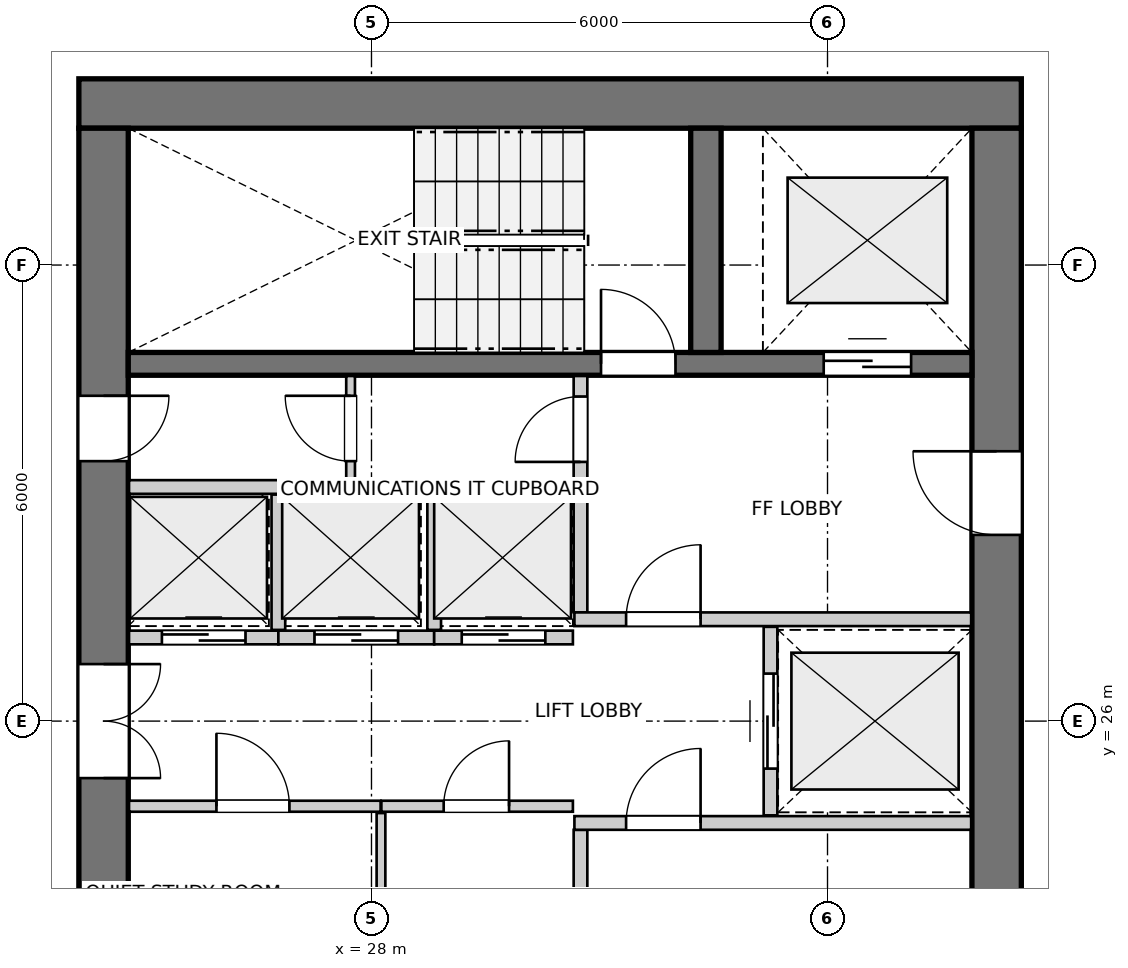
"""IFC4 building model, lengths in metres.
Left out: names, types, materials, properties, quantities, classifications, styles, units other than length and angle.
Written with IfcOpenShell. Run it as: python <this file> out.ifc"""

import sys

from ifc_helpers import new_model, si_unit, direction, frame, frame_2d, origin, place, context, subcontext, project, spatial, rectangle, extrude, source, transform, mapped, element, fill, save


model = new_model("IFC4")
c1 = context("Model", 3, precision=1e-05, world=origin(), true_north=direction((0.0, 1.0)))
c2 = subcontext(c1, "Body", "Model", "MODEL_VIEW")
j1 = project(units=[si_unit("LENGTHUNIT", "METRE"), si_unit("PLANEANGLEUNIT", "RADIAN")], contexts=[c1])
p1 = place(None, origin())
s1 = spatial("IfcSite", under=j1, at=p1, CompositionType="ELEMENT")
p2 = place(p1, origin())
s2 = spatial("IfcBuilding", under=s1, at=p2, CompositionType="ELEMENT")
p3 = place(p2, frame((0.0, 0.0, 149.0)))
s3 = spatial("IfcBuildingStorey", under=s2, at=p3, CompositionType="ELEMENT", Elevation=149.0)
p4 = place(p3, frame((36.55, 34.125, 0.0), z_axis=(0.0, 0.0, 1.0), x_axis=(-1.0, 0.0, 0.0)))
e1 = element("IfcWall", 1, at=p4, inside=s3, PredefinedType="SHEAR", context=c2, shape_type="SweptSolid", body=[
    extrude(rectangle(XDim=12.4, YDim=0.65, at=frame_2d((6.2, 0.0))), origin(), (0.0, 0.0, 1.0), 2.935),
])
p5 = place(p3, frame((24.475, 33.8, 0.0), z_axis=(0.0, 0.0, 1.0), x_axis=(0.0, -1.0, 0.0)))
e2 = element("IfcWall", 2, at=p5, inside=s3, PredefinedType="SHEAR", context=c2, shape_type="SweptSolid", body=[
    extrude(rectangle(XDim=15.6, YDim=0.65, at=frame_2d((7.8, 0.0))), origin(), (0.0, 0.0, 1.0), 2.935),
])
p6 = place(p5, frame((7.05, 0.0, 0.0)))
e3 = element("IfcOpeningElement", 3, at=p6, cuts=e2, PredefinedType="OPENING", context=c2, shape_type="SweptSolid", body=[
    extrude(rectangle(XDim=1.5, YDim=2.15, at=frame_2d((0.75, 1.075))), frame((0.0, 0.335, 0.0), z_axis=(0.0, -1.0, 0.0), x_axis=(1.0, 0.0, 0.0)), (0.0, 0.0, 1.0), 0.67),
])
p7 = place(p5, frame((3.52, 0.0, 0.0)))
e4 = element("IfcOpeningElement", 4, at=p7, cuts=e2, PredefinedType="OPENING", context=c2, shape_type="SweptSolid", body=[
    extrude(rectangle(XDim=0.86, YDim=2.05, at=frame_2d((0.43, 1.025))), frame((0.0, 0.335, 0.0), z_axis=(0.0, -1.0, 0.0), x_axis=(1.0, 0.0, 0.0)), (0.0, 0.0, 1.0), 0.67),
])
p8 = place(p5, frame((11.22, 0.0, 0.0)))
e5 = element("IfcOpeningElement", 5, at=p8, cuts=e2, PredefinedType="OPENING", context=c2, shape_type="SweptSolid", body=[
    extrude(rectangle(XDim=0.86, YDim=2.05, at=frame_2d((0.43, 1.025))), frame((0.0, 0.335, 0.0), z_axis=(0.0, -1.0, 0.0), x_axis=(1.0, 0.0, 0.0)), (0.0, 0.0, 1.0), 0.67),
])
p9 = place(p3, frame((36.225, 18.2, 0.0), z_axis=(0.0, 0.0, 1.0), x_axis=(0.0, 1.0, 0.0)))
e6 = element("IfcWall", 6, at=p9, inside=s3, PredefinedType="SHEAR", context=c2, shape_type="SweptSolid", body=[
    extrude(rectangle(XDim=15.6, YDim=0.65, at=frame_2d((7.8, 0.0))), origin(), (0.0, 0.0, 1.0), 2.935),
])
p10 = place(p9, frame((4.25, 0.0, 0.0)))
e7 = element("IfcOpeningElement", 7, at=p10, cuts=e6, PredefinedType="OPENING", context=c2, shape_type="SweptSolid", body=[
    extrude(rectangle(XDim=1.1, YDim=2.15, at=frame_2d((0.55, 1.075))), frame((0.0, 0.335, 0.0), z_axis=(0.0, -1.0, 0.0), x_axis=(1.0, 0.0, 0.0)), (0.0, 0.0, 1.0), 0.67),
])
p11 = place(p9, frame((10.25, 0.0, 0.0)))
e8 = element("IfcOpeningElement", 8, at=p11, cuts=e6, PredefinedType="OPENING", context=c2, shape_type="SweptSolid", body=[
    extrude(rectangle(XDim=1.1, YDim=2.15, at=frame_2d((0.55, 1.075))), frame((0.0, 0.335, 0.0), z_axis=(0.0, -1.0, 0.0), x_axis=(1.0, 0.0, 0.0)), (0.0, 0.0, 1.0), 0.67),
])
p12 = place(p3, frame((24.8, 30.7, 0.0), z_axis=(0.0, 0.0, 1.0), x_axis=(1.0, 0.0, 0.0)))
e9 = element("IfcWall", 9, at=p12, inside=s3, PredefinedType="SHEAR", context=c2, shape_type="SweptSolid", body=[
    extrude(rectangle(XDim=11.1, YDim=0.3, at=frame_2d((5.55, 0.0))), origin(), (0.0, 0.0, 1.0), 2.935),
])
p13 = place(p12, frame((6.22, 0.0, 0.0)))
e10 = element("IfcOpeningElement", 10, at=p13, cuts=e9, PredefinedType="OPENING", context=c2, shape_type="SweptSolid", body=[
    extrude(rectangle(XDim=0.98, YDim=2.15, at=frame_2d((0.49, 1.075))), frame((0.0, 0.16, 0.0), z_axis=(0.0, -1.0, 0.0), x_axis=(1.0, 0.0, 0.0)), (0.0, 0.0, 1.0), 0.32),
])
p14 = place(p12, frame((9.15, 0.0, 0.0)))
e11 = element("IfcOpeningElement", 11, at=p14, cuts=e9, PredefinedType="OPENING", context=c2, shape_type="SweptSolid", body=[
    extrude(rectangle(XDim=1.15, YDim=2.15, at=frame_2d((0.575, 1.075))), frame((0.0, 0.16, 0.0), z_axis=(0.0, -1.0, 0.0), x_axis=(1.0, 0.0, 0.0)), (0.0, 0.0, 1.0), 0.32),
])
p15 = place(p3, frame((32.4, 30.85, 0.0), z_axis=(0.0, 0.0, 1.0), x_axis=(0.0, 1.0, 0.0)))
e12 = element("IfcWall", 12, at=p15, inside=s3, PredefinedType="SHEAR", context=c2, shape_type="SweptSolid", body=[
    extrude(rectangle(XDim=2.95, YDim=0.4, at=frame_2d((1.475, 0.0))), origin(), (0.0, 0.0, 1.0), 2.935),
])
p16 = place(p3, frame((30.75, 21.46, 0.0), z_axis=(0.0, 0.0, 1.0), x_axis=(0.0, 1.0, 0.0)))
e13 = element("IfcWall", 13, at=p16, inside=s3, PredefinedType="PARTITIONING", context=c2, shape_type="SweptSolid", body=[
    extrude(rectangle(XDim=3.11, YDim=0.18, at=frame_2d((1.555, 0.0))), origin(), (0.0, 0.0, 1.0), 2.935),
])
p17 = place(p16, frame((0.26, 0.0, 0.0)))
e14 = element("IfcOpeningElement", 14, at=p17, cuts=e13, PredefinedType="OPENING", context=c2, shape_type="SweptSolid", body=[
    extrude(rectangle(XDim=0.86, YDim=2.05, at=frame_2d((0.43, 1.025))), frame((0.0, 0.1, 0.0), z_axis=(0.0, -1.0, 0.0), x_axis=(1.0, 0.0, 0.0)), (0.0, 0.0, 1.0), 0.2),
])
p18 = place(p3, frame((30.67, 24.66, 0.0), z_axis=(0.0, 0.0, 1.0), x_axis=(1.0, 0.0, 0.0)))
e15 = element("IfcWall", 15, at=p18, inside=s3, PredefinedType="PARTITIONING", context=c2, shape_type="SweptSolid", body=[
    extrude(rectangle(XDim=5.22, YDim=0.18, at=frame_2d((2.61, 0.0))), origin(), (0.0, 0.0, 1.0), 2.935),
])
p19 = place(p18, frame((0.68, 0.0, 0.0)))
e16 = element("IfcOpeningElement", 16, at=p19, cuts=e15, PredefinedType="OPENING", context=c2, shape_type="SweptSolid", body=[
    extrude(rectangle(XDim=0.98, YDim=2.15, at=frame_2d((0.49, 1.075))), frame((0.0, 0.1, 0.0), z_axis=(0.0, -1.0, 0.0), x_axis=(1.0, 0.0, 0.0)), (0.0, 0.0, 1.0), 0.2),
])
p20 = place(p3, frame((30.75, 27.43, 0.0), z_axis=(0.0, 0.0, 1.0), x_axis=(0.0, 1.0, 0.0)))
e17 = element("IfcWall", 17, at=p20, inside=s3, PredefinedType="PARTITIONING", context=c2, shape_type="SweptSolid", body=[
    extrude(rectangle(XDim=3.11, YDim=0.18, at=frame_2d((1.555, 0.0))), origin(), (0.0, 0.0, 1.0), 2.935),
])
p21 = place(p20, frame((1.98, 0.0, 0.0)))
e18 = element("IfcOpeningElement", 18, at=p21, cuts=e17, PredefinedType="OPENING", context=c2, shape_type="SweptSolid", body=[
    extrude(rectangle(XDim=0.86, YDim=2.05, at=frame_2d((0.43, 1.025))), frame((0.0, 0.1, 0.0), z_axis=(0.0, -1.0, 0.0), x_axis=(1.0, 0.0, 0.0)), (0.0, 0.0, 1.0), 0.2),
])
p22 = place(p3, frame((30.67, 27.34, 0.0), z_axis=(0.0, 0.0, 1.0), x_axis=(1.0, 0.0, 0.0)))
e19 = element("IfcWall", 19, at=p22, inside=s3, PredefinedType="PARTITIONING", context=c2, shape_type="SweptSolid", body=[
    extrude(rectangle(XDim=5.22, YDim=0.18, at=frame_2d((2.61, 0.0))), origin(), (0.0, 0.0, 1.0), 2.935),
])
p23 = place(p22, frame((0.68, 0.0, 0.0)))
e20 = element("IfcOpeningElement", 20, at=p23, cuts=e19, PredefinedType="OPENING", context=c2, shape_type="SweptSolid", body=[
    extrude(rectangle(XDim=0.98, YDim=2.15, at=frame_2d((0.49, 1.075))), frame((0.0, 0.1, 0.0), z_axis=(0.0, -1.0, 0.0), x_axis=(1.0, 0.0, 0.0)), (0.0, 0.0, 1.0), 0.2),
])
p24 = place(p3, frame((33.25, 24.76, 0.0), z_axis=(0.0, 0.0, 1.0), x_axis=(0.0, 1.0, 0.0)))
e21 = element("IfcWall", 21, at=p24, inside=s3, PredefinedType="PARTITIONING", context=c2, shape_type="SweptSolid", body=[
    extrude(rectangle(XDim=2.48, YDim=0.18, at=frame_2d((1.24, 0.0))), origin(), (0.0, 0.0, 1.0), 2.935),
])
p25 = place(p24, frame((0.615, 0.0, 0.0)))
e22 = element("IfcOpeningElement", 22, at=p25, cuts=e21, PredefinedType="OPENING", context=c2, shape_type="SweptSolid", body=[
    extrude(rectangle(XDim=1.25, YDim=2.15, at=frame_2d((0.625, 1.075))), frame((0.0, 0.1, 0.0), z_axis=(0.0, -1.0, 0.0), x_axis=(1.0, 0.0, 0.0)), (0.0, 0.0, 1.0), 0.2),
])
p26 = place(p3, frame((24.81, 24.88, 0.0), z_axis=(0.0, 0.0, 1.0), x_axis=(1.0, 0.0, 0.0)))
e23 = element("IfcWall", 23, at=p26, inside=s3, PredefinedType="PARTITIONING", context=c2, shape_type="SweptSolid", body=[
    extrude(rectangle(XDim=3.31, YDim=0.145, at=frame_2d((1.655, 0.0))), origin(), (0.0, 0.0, 1.0), 2.935),
])
p27 = place(p26, frame((1.15, 0.0, 0.0)))
e24 = element("IfcOpeningElement", 24, at=p27, cuts=e23, PredefinedType="OPENING", context=c2, shape_type="SweptSolid", body=[
    extrude(rectangle(XDim=0.96, YDim=2.1, at=frame_2d((0.48, 1.05))), frame((0.0, 0.083, 0.0), z_axis=(0.0, -1.0, 0.0), x_axis=(1.0, 0.0, 0.0)), (0.0, 0.0, 1.0), 0.165),
])
p28 = place(p3, frame((28.13, 24.88, 0.0), z_axis=(0.0, 0.0, 1.0), x_axis=(1.0, 0.0, 0.0)))
e25 = element("IfcWall", 25, at=p28, inside=s3, PredefinedType="PARTITIONING", context=c2, shape_type="SweptSolid", body=[
    extrude(rectangle(XDim=2.52, YDim=0.145, at=frame_2d((1.26, 0.0))), origin(), (0.0, 0.0, 1.0), 2.935),
])
p29 = place(p28, frame((0.82, 0.0, 0.0)))
e26 = element("IfcOpeningElement", 26, at=p29, cuts=e25, PredefinedType="OPENING", context=c2, shape_type="SweptSolid", body=[
    extrude(rectangle(XDim=0.86, YDim=2.05, at=frame_2d((0.43, 1.025))), frame((0.0, 0.083, 0.0), z_axis=(0.0, -1.0, 0.0), x_axis=(1.0, 0.0, 0.0)), (0.0, 0.0, 1.0), 0.165),
])
p30 = place(p3, frame((28.125, 23.02, 0.0), z_axis=(0.0, 0.0, 1.0), x_axis=(0.0, 1.0, 0.0)))
e27 = element("IfcWall", 27, at=p30, inside=s3, PredefinedType="PARTITIONING", context=c2, shape_type="SweptSolid", body=[
    extrude(rectangle(XDim=1.77, YDim=0.115, at=frame_2d((0.885, 0.0))), origin(), (0.0, 0.0, 1.0), 2.935),
])
p31 = place(p3, frame((24.81, 29.08, 0.0), z_axis=(0.0, 0.0, 1.0), x_axis=(1.0, 0.0, 0.0)))
e28 = element("IfcWall", 28, at=p31, inside=s3, PredefinedType="PARTITIONING", context=c2, shape_type="SweptSolid", body=[
    extrude(rectangle(XDim=5.84, YDim=0.18, at=frame_2d((2.92, 0.0))), origin(), (0.0, 0.0, 1.0), 2.935),
])
p32 = place(p3, frame((24.81, 27.1, 0.0), z_axis=(0.0, 0.0, 1.0), x_axis=(1.0, 0.0, 0.0)))
e29 = element("IfcWall", 29, at=p32, inside=s3, PredefinedType="PARTITIONING", context=c2, shape_type="SweptSolid", body=[
    extrude(rectangle(XDim=1.965, YDim=0.18, at=frame_2d((0.982, 0.0))), origin(), (0.0, 0.0, 1.0), 2.935),
])
p33 = place(p32, frame((0.433, 0.0, 0.0)))
e30 = element("IfcOpeningElement", 30, at=p33, cuts=e29, PredefinedType="OPENING", context=c2, shape_type="SweptSolid", body=[
    extrude(rectangle(XDim=1.1, YDim=2.15, at=frame_2d((0.55, 1.075))), frame((0.0, 0.1, 0.0), z_axis=(0.0, -1.0, 0.0), x_axis=(1.0, 0.0, 0.0)), (0.0, 0.0, 1.0), 0.2),
])
p34 = place(p3, frame((26.775, 27.1, 0.0), z_axis=(0.0, 0.0, 1.0), x_axis=(1.0, 0.0, 0.0)))
e31 = element("IfcWall", 31, at=p34, inside=s3, PredefinedType="PARTITIONING", context=c2, shape_type="SweptSolid", body=[
    extrude(rectangle(XDim=2.05, YDim=0.18, at=frame_2d((1.025, 0.0))), origin(), (0.0, 0.0, 1.0), 2.935),
])
p35 = place(p34, frame((0.475, 0.0, 0.0)))
e32 = element("IfcOpeningElement", 32, at=p35, cuts=e31, PredefinedType="OPENING", context=c2, shape_type="SweptSolid", body=[
    extrude(rectangle(XDim=1.1, YDim=2.15, at=frame_2d((0.55, 1.075))), frame((0.0, 0.1, 0.0), z_axis=(0.0, -1.0, 0.0), x_axis=(1.0, 0.0, 0.0)), (0.0, 0.0, 1.0), 0.2),
])
p36 = place(p3, frame((26.775, 27.2, 0.0), z_axis=(0.0, 0.0, 1.0), x_axis=(0.0, 1.0, 0.0)))
e33 = element("IfcWall", 33, at=p36, inside=s3, PredefinedType="PARTITIONING", context=c2, shape_type="SweptSolid", body=[
    extrude(rectangle(XDim=1.78, YDim=0.18, at=frame_2d((0.89, 0.0))), origin(), (0.0, 0.0, 1.0), 2.935),
])
p37 = place(p3, frame((28.825, 27.1, 0.0), z_axis=(0.0, 0.0, 1.0), x_axis=(1.0, 0.0, 0.0)))
e34 = element("IfcWall", 34, at=p37, inside=s3, PredefinedType="PARTITIONING", context=c2, shape_type="SweptSolid", body=[
    extrude(rectangle(XDim=1.825, YDim=0.18, at=frame_2d((0.913, 0.0))), origin(), (0.0, 0.0, 1.0), 2.935),
])
p38 = place(p37, frame((0.363, 0.0, 0.0)))
e35 = element("IfcOpeningElement", 35, at=p38, cuts=e34, PredefinedType="OPENING", context=c2, shape_type="SweptSolid", body=[
    extrude(rectangle(XDim=1.1, YDim=2.15, at=frame_2d((0.55, 1.075))), frame((0.0, 0.1, 0.0), z_axis=(0.0, -1.0, 0.0), x_axis=(1.0, 0.0, 0.0)), (0.0, 0.0, 1.0), 0.2),
])
p39 = place(p3, frame((28.825, 27.2, 0.0), z_axis=(0.0, 0.0, 1.0), x_axis=(0.0, 1.0, 0.0)))
e36 = element("IfcWall", 36, at=p39, inside=s3, PredefinedType="PARTITIONING", context=c2, shape_type="SweptSolid", body=[
    extrude(rectangle(XDim=1.78, YDim=0.18, at=frame_2d((0.89, 0.0))), origin(), (0.0, 0.0, 1.0), 2.935),
])
p40 = place(p3, frame((27.725, 29.16, 0.0), z_axis=(0.0, 0.0, 1.0), x_axis=(0.0, 1.0, 0.0)))
e37 = element("IfcWall", 37, at=p40, inside=s3, PredefinedType="PARTITIONING", context=c2, shape_type="SweptSolid", body=[
    extrude(rectangle(XDim=1.38, YDim=0.115, at=frame_2d((0.69, 0.0))), origin(), (0.0, 0.0, 1.0), 2.935),
])
p41 = place(p40, frame((0.26, 0.0, 0.0)))
e38 = element("IfcOpeningElement", 38, at=p41, cuts=e37, PredefinedType="OPENING", context=c2, shape_type="SweptSolid", body=[
    extrude(rectangle(XDim=0.86, YDim=2.05, at=frame_2d((0.43, 1.025))), frame((0.0, 0.067, 0.0), z_axis=(0.0, -1.0, 0.0), x_axis=(1.0, 0.0, 0.0)), (0.0, 0.0, 1.0), 0.135),
])
m1 = source(origin(), c2, "Body", "SweptSolid", [
    extrude(rectangle(XDim=0.98, YDim=2.15, at=frame_2d((0.49, 1.075))), frame((0.0, 0.025, 0.0), z_axis=(0.0, -1.0, 0.0), x_axis=(1.0, 0.0, 0.0)), (0.0, 0.0, 1.0), 0.05),
])
p42 = place(p13, origin())
e39 = element("IfcDoor", 39, at=p42, inside=s3, OperationType="SINGLE_SWING_LEFT", PredefinedType="DOOR", context=c2, shape_type="MappedRepresentation", body=[
    mapped(m1, transform((0.0, 0.0, 0.0), x_axis=(1.0, 0.0, 0.0), y_axis=(0.0, 1.0, 0.0), z_axis=(0.0, 0.0, 1.0), scale=1.0)),
])
fill(e10, e39)
m2 = source(origin(), c2, "Body", "SweptSolid", [
    extrude(rectangle(XDim=1.15, YDim=2.15, at=frame_2d((0.575, 1.075))), frame((0.0, 0.025, 0.0), z_axis=(0.0, -1.0, 0.0), x_axis=(1.0, 0.0, 0.0)), (0.0, 0.0, 1.0), 0.05),
])
p43 = place(p14, origin())
e40 = element("IfcDoor", 40, at=p43, inside=s3, OperationType="DOUBLE_DOOR_SLIDING", PredefinedType="DOOR", context=c2, shape_type="MappedRepresentation", body=[
    mapped(m2, transform((0.0, 0.0, 0.0), x_axis=(1.0, 0.0, 0.0), y_axis=(0.0, 1.0, 0.0), z_axis=(0.0, 0.0, 1.0), scale=1.0)),
])
fill(e11, e40)
m3 = source(origin(), c2, "Body", "SweptSolid", [
    extrude(rectangle(XDim=1.1, YDim=2.15, at=frame_2d((0.55, 1.075))), frame((0.0, 0.025, 0.0), z_axis=(0.0, -1.0, 0.0), x_axis=(1.0, 0.0, 0.0)), (0.0, 0.0, 1.0), 0.05),
])
p44 = place(p11, origin())
e41 = element("IfcDoor", 41, at=p44, inside=s3, OperationType="SINGLE_SWING_RIGHT", PredefinedType="DOOR", context=c2, shape_type="MappedRepresentation", body=[
    mapped(m3, transform((0.0, 0.0, 0.0), x_axis=(1.0, 0.0, 0.0), y_axis=(0.0, 1.0, 0.0), z_axis=(0.0, 0.0, 1.0), scale=1.0)),
])
fill(e8, e41)
m4 = source(origin(), c2, "Body", "SweptSolid", [
    extrude(rectangle(XDim=1.5, YDim=2.15, at=frame_2d((0.75, 1.075))), frame((0.0, 0.025, 0.0), z_axis=(0.0, -1.0, 0.0), x_axis=(1.0, 0.0, 0.0)), (0.0, 0.0, 1.0), 0.05),
])
p45 = place(p6, origin())
e42 = element("IfcDoor", 42, at=p45, inside=s3, OperationType="DOUBLE_DOOR_SINGLE_SWING", PredefinedType="DOOR", context=c2, shape_type="MappedRepresentation", body=[
    mapped(m4, transform((0.0, 0.0, 0.0), x_axis=(1.0, 0.0, 0.0), y_axis=(0.0, 1.0, 0.0), z_axis=(0.0, 0.0, 1.0), scale=1.0)),
])
fill(e3, e42)
m5 = source(origin(), c2, "Body", "SweptSolid", [
    extrude(rectangle(XDim=0.86, YDim=2.05, at=frame_2d((0.43, 1.025))), frame((0.0, 0.025, 0.0), z_axis=(0.0, -1.0, 0.0), x_axis=(1.0, 0.0, 0.0)), (0.0, 0.0, 1.0), 0.05),
])
p46 = place(p7, origin())
e43 = element("IfcDoor", 43, at=p46, inside=s3, OperationType="SINGLE_SWING_LEFT", PredefinedType="DOOR", context=c2, shape_type="MappedRepresentation", body=[
    mapped(m5, transform((0.0, 0.0, 0.0), x_axis=(1.0, 0.0, 0.0), y_axis=(0.0, 1.0, 0.0), z_axis=(0.0, 0.0, 1.0), scale=1.0)),
])
fill(e4, e43)
p47 = place(p19, origin())
e44 = element("IfcDoor", 44, at=p47, inside=s3, OperationType="SINGLE_SWING_RIGHT", PredefinedType="DOOR", context=c2, shape_type="MappedRepresentation", body=[
    mapped(m1, transform((0.0, 0.0, 0.0), x_axis=(1.0, 0.0, 0.0), y_axis=(0.0, 1.0, 0.0), z_axis=(0.0, 0.0, 1.0), scale=1.0)),
])
fill(e16, e44)
p48 = place(p21, origin())
e45 = element("IfcDoor", 45, at=p48, inside=s3, OperationType="SINGLE_SWING_LEFT", PredefinedType="DOOR", context=c2, shape_type="MappedRepresentation", body=[
    mapped(m5, transform((0.0, 0.0, 0.0), x_axis=(1.0, 0.0, 0.0), y_axis=(0.0, 1.0, 0.0), z_axis=(0.0, 0.0, 1.0), scale=1.0)),
])
fill(e18, e45)
p49 = place(p23, origin())
e46 = element("IfcDoor", 46, at=p49, inside=s3, OperationType="SINGLE_SWING_RIGHT", PredefinedType="DOOR", context=c2, shape_type="MappedRepresentation", body=[
    mapped(m1, transform((0.0, 0.0, 0.0), x_axis=(1.0, 0.0, 0.0), y_axis=(0.0, 1.0, 0.0), z_axis=(0.0, 0.0, 1.0), scale=1.0)),
])
fill(e20, e46)
m6 = source(origin(), c2, "Body", "SweptSolid", [
    extrude(rectangle(XDim=1.25, YDim=2.15, at=frame_2d((0.625, 1.075))), frame((0.0, 0.025, 0.0), z_axis=(0.0, -1.0, 0.0), x_axis=(1.0, 0.0, 0.0)), (0.0, 0.0, 1.0), 0.05),
])
p50 = place(p25, origin())
e47 = element("IfcDoor", 47, at=p50, inside=s3, OperationType="DOUBLE_DOOR_SLIDING", PredefinedType="DOOR", context=c2, shape_type="MappedRepresentation", body=[
    mapped(m6, transform((0.0, 0.0, 0.0), x_axis=(1.0, 0.0, 0.0), y_axis=(0.0, 1.0, 0.0), z_axis=(0.0, 0.0, 1.0), scale=1.0)),
])
fill(e22, e47)
m7 = source(origin(), c2, "Body", "SweptSolid", [
    extrude(rectangle(XDim=0.96, YDim=2.1, at=frame_2d((0.48, 1.05))), frame((0.0, 0.025, 0.0), z_axis=(0.0, -1.0, 0.0), x_axis=(1.0, 0.0, 0.0)), (0.0, 0.0, 1.0), 0.05),
])
p51 = place(p27, origin())
e48 = element("IfcDoor", 48, at=p51, inside=s3, OperationType="SINGLE_SWING_LEFT", PredefinedType="DOOR", context=c2, shape_type="MappedRepresentation", body=[
    mapped(m7, transform((0.0, 0.0, 0.0), x_axis=(1.0, 0.0, 0.0), y_axis=(0.0, 1.0, 0.0), z_axis=(0.0, 0.0, 1.0), scale=1.0)),
])
fill(e24, e48)
p52 = place(p29, origin())
e49 = element("IfcDoor", 49, at=p52, inside=s3, OperationType="SINGLE_SWING_RIGHT", PredefinedType="DOOR", context=c2, shape_type="MappedRepresentation", body=[
    mapped(m5, transform((0.0, 0.0, 0.0), x_axis=(1.0, 0.0, 0.0), y_axis=(0.0, 1.0, 0.0), z_axis=(0.0, 0.0, 1.0), scale=1.0)),
])
fill(e26, e49)
p53 = place(p33, origin())
e50 = element("IfcDoor", 50, at=p53, inside=s3, OperationType="DOUBLE_DOOR_SLIDING", PredefinedType="DOOR", context=c2, shape_type="MappedRepresentation", body=[
    mapped(m3, transform((0.0, 0.0, 0.0), x_axis=(1.0, 0.0, 0.0), y_axis=(0.0, 1.0, 0.0), z_axis=(0.0, 0.0, 1.0), scale=1.0)),
])
fill(e30, e50)
p54 = place(p35, origin())
e51 = element("IfcDoor", 51, at=p54, inside=s3, OperationType="DOUBLE_DOOR_SLIDING", PredefinedType="DOOR", context=c2, shape_type="MappedRepresentation", body=[
    mapped(m3, transform((0.0, 0.0, 0.0), x_axis=(1.0, 0.0, 0.0), y_axis=(0.0, 1.0, 0.0), z_axis=(0.0, 0.0, 1.0), scale=1.0)),
])
fill(e32, e51)
p55 = place(p38, origin())
e52 = element("IfcDoor", 52, at=p55, inside=s3, OperationType="DOUBLE_DOOR_SLIDING", PredefinedType="DOOR", context=c2, shape_type="MappedRepresentation", body=[
    mapped(m3, transform((0.0, 0.0, 0.0), x_axis=(1.0, 0.0, 0.0), y_axis=(0.0, 1.0, 0.0), z_axis=(0.0, 0.0, 1.0), scale=1.0)),
])
fill(e35, e52)
p56 = place(p41, origin())
e53 = element("IfcDoor", 53, at=p56, inside=s3, OperationType="SINGLE_SWING_RIGHT", PredefinedType="DOOR", context=c2, shape_type="MappedRepresentation", body=[
    mapped(m5, transform((0.0, 0.0, 0.0), x_axis=(1.0, 0.0, 0.0), y_axis=(0.0, 1.0, 0.0), z_axis=(0.0, 0.0, 1.0), scale=1.0)),
])
fill(e38, e53)
save(model, sys.argv[1])
